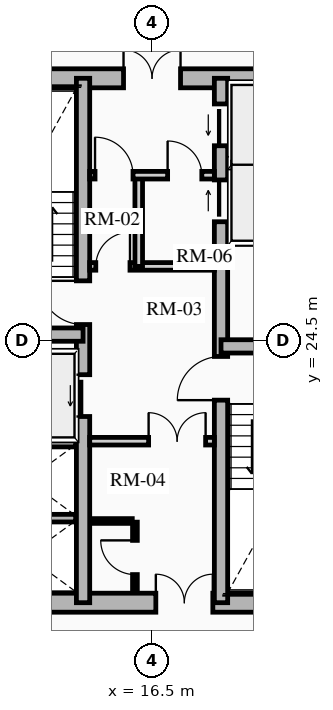
"""IFC4 building model, lengths in metres.
Left out: names, types, materials, properties, quantities, classifications, styles, units other than length and angle.
Written with IfcOpenShell. Run it as: python <this file> out.ifc"""

import sys

from ifc_helpers import new_model, si_unit, direction, frame, frame_2d, origin, place, context, subcontext, project, spatial, rectangle, extrude, source, transform, mapped, element, fill, save


model = new_model("IFC4")
c1 = context("Model", 3, precision=1e-05, world=origin(), true_north=direction((0.0, 1.0)))
c2 = subcontext(c1, "Body", "Model", "MODEL_VIEW")
j1 = project(units=[si_unit("LENGTHUNIT", "METRE"), si_unit("PLANEANGLEUNIT", "RADIAN")], contexts=[c1])
p1 = place(None, origin())
s1 = spatial("IfcSite", under=j1, at=p1, CompositionType="ELEMENT")
p2 = place(p1, origin())
s2 = spatial("IfcBuilding", under=s1, at=p2, CompositionType="ELEMENT")
p3 = place(p2, frame((0.0, 0.0, 24.91)))
s3 = spatial("IfcBuildingStorey", under=s2, at=p3, CompositionType="ELEMENT", Elevation=24.91)
p4 = place(p3, frame((11.15, 17.6, 0.0), z_axis=(0.0, 0.0, 1.0), x_axis=(1.0, 0.0, 0.0)))
e1 = element("IfcWall", 1, at=p4, inside=s3, PredefinedType="SHEAR", context=c2, shape_type="SweptSolid", body=[
    extrude(rectangle(XDim=10.7, YDim=0.5, at=frame_2d((5.35, 0.0))), origin(), (0.0, 0.0, 1.0), 2.91),
])
m1 = source(origin(), c2, "Body", "SweptSolid", [
    extrude(rectangle(XDim=1.5, YDim=2.02, at=frame_2d((0.75, 1.01))), frame((0.0, 0.26, 0.0), z_axis=(0.0, -1.0, 0.0), x_axis=(1.0, 0.0, 0.0)), (0.0, 0.0, 1.0), 0.52),
])
p5 = place(p4, frame((5.45, 0.0, 0.0)))
e2 = element("IfcOpeningElement", 2, at=p5, cuts=e1, PredefinedType="OPENING", context=c2, shape_type="MappedRepresentation", body=[
    mapped(m1, transform((0.0, 0.0, 0.0), x_axis=(1.0, 0.0, 0.0), y_axis=(0.0, 1.0, 0.0), z_axis=(0.0, 0.0, 1.0), scale=1.0)),
])
p6 = place(p3, frame((11.15, 31.4, 0.0), z_axis=(0.0, 0.0, 1.0), x_axis=(1.0, 0.0, 0.0)))
e3 = element("IfcWall", 3, at=p6, inside=s3, PredefinedType="SHEAR", context=c2, shape_type="SweptSolid", body=[
    extrude(rectangle(XDim=10.7, YDim=0.5, at=frame_2d((5.35, 0.0))), origin(), (0.0, 0.0, 1.0), 2.91),
])
p7 = place(p6, frame((4.6, 0.0, 0.0)))
e4 = element("IfcOpeningElement", 4, at=p7, cuts=e3, PredefinedType="OPENING", context=c2, shape_type="MappedRepresentation", body=[
    mapped(m1, transform((0.0, 0.0, 0.0), x_axis=(1.0, 0.0, 0.0), y_axis=(0.0, 1.0, 0.0), z_axis=(0.0, 0.0, 1.0), scale=1.0)),
])
p8 = place(p3, frame((14.685, 17.6, 0.0), z_axis=(0.0, 0.0, 1.0), x_axis=(0.0, 1.0, 0.0)))
e5 = element("IfcWall", 5, at=p8, inside=s3, PredefinedType="SHEAR", context=c2, shape_type="SweptSolid", body=[
    extrude(rectangle(XDim=13.8, YDim=0.35, at=frame_2d((6.9, 0.0))), origin(), (0.0, 0.0, 1.0), 2.91),
])
m2 = source(origin(), c2, "Body", "SweptSolid", [
    extrude(rectangle(XDim=1.1, YDim=2.015, at=frame_2d((0.55, 1.007))), frame((0.0, 0.185, 0.0), z_axis=(0.0, -1.0, 0.0), x_axis=(1.0, 0.0, 0.0)), (0.0, 0.0, 1.0), 0.37),
])
p9 = place(p8, frame((4.9, 0.0, 0.0)))
e6 = element("IfcOpeningElement", 6, at=p9, cuts=e5, PredefinedType="OPENING", context=c2, shape_type="MappedRepresentation", body=[
    mapped(m2, transform((0.0, 0.0, 0.0), x_axis=(1.0, 0.0, 0.0), y_axis=(0.0, 1.0, 0.0), z_axis=(0.0, 0.0, 1.0), scale=1.0)),
])
m3 = source(origin(), c2, "Body", "SweptSolid", [
    extrude(rectangle(XDim=1.15, YDim=2.02, at=frame_2d((0.575, 1.01))), frame((0.0, 0.185, 0.0), z_axis=(0.0, -1.0, 0.0), x_axis=(1.0, 0.0, 0.0)), (0.0, 0.0, 1.0), 0.37),
])
p10 = place(p8, frame((7.32, 0.0, 0.0)))
e7 = element("IfcOpeningElement", 7, at=p10, cuts=e5, PredefinedType="OPENING", context=c2, shape_type="MappedRepresentation", body=[
    mapped(m3, transform((0.0, 0.0, 0.0), x_axis=(1.0, 0.0, 0.0), y_axis=(0.0, 1.0, 0.0), z_axis=(0.0, 0.0, 1.0), scale=1.0)),
])
p11 = place(p3, frame((18.315, 17.6, 0.0), z_axis=(0.0, 0.0, 1.0), x_axis=(0.0, 1.0, 0.0)))
e8 = element("IfcWall", 8, at=p11, inside=s3, PredefinedType="SHEAR", context=c2, shape_type="SweptSolid", body=[
    extrude(rectangle(XDim=13.8, YDim=0.35, at=frame_2d((6.9, 0.0))), origin(), (0.0, 0.0, 1.0), 2.91),
])
p12 = place(p11, frame((10.025, 0.0, 0.0)))
e9 = element("IfcOpeningElement", 9, at=p12, cuts=e8, PredefinedType="OPENING", context=c2, shape_type="MappedRepresentation", body=[
    mapped(m2, transform((0.0, 0.0, 0.0), x_axis=(1.0, 0.0, 0.0), y_axis=(0.0, 1.0, 0.0), z_axis=(0.0, 0.0, 1.0), scale=1.0)),
])
p13 = place(p11, frame((12.025, 0.0, 0.0)))
e10 = element("IfcOpeningElement", 10, at=p13, cuts=e8, PredefinedType="OPENING", context=c2, shape_type="MappedRepresentation", body=[
    mapped(m2, transform((0.0, 0.0, 0.0), x_axis=(1.0, 0.0, 0.0), y_axis=(0.0, 1.0, 0.0), z_axis=(0.0, 0.0, 1.0), scale=1.0)),
])
p14 = place(p11, frame((5.33, 0.0, 0.0)))
e11 = element("IfcOpeningElement", 11, at=p14, cuts=e8, PredefinedType="OPENING", context=c2, shape_type="MappedRepresentation", body=[
    mapped(m3, transform((0.0, 0.0, 0.0), x_axis=(1.0, 0.0, 0.0), y_axis=(0.0, 1.0, 0.0), z_axis=(0.0, 0.0, 1.0), scale=1.0)),
])
for number, where, z_axis, x_axis in (
    (12, (11.4, 24.655, 0.0), (0.0, 0.0, 1.0), (1.0, 0.0, 0.0)),
    (13, (18.315, 24.345, 0.0), (0.0, 0.0, 1.0), (1.0, 0.0, 0.0)),
):
    element("IfcWall", number, at=place(p3, frame(where, z_axis=z_axis, x_axis=x_axis)), inside=s3, PredefinedType="SHEAR", context=c2, shape_type="SweptSolid", body=[
        extrude(rectangle(XDim=3.285, YDim=0.35, at=frame_2d((1.643, 0.0))), origin(), (0.0, 0.0, 1.0), 2.91),
    ])
for number, where, z_axis, x_axis in (
    (14, (11.52, 21.8, 0.0), (0.0, 0.0, 1.0), (1.0, 0.0, 0.0)),
    (15, (11.52, 19.825, 0.0), (0.0, 0.0, 1.0), (1.0, 0.0, 0.0)),
    (16, (18.51, 27.13, 0.0), (0.0, 0.0, 1.0), (1.0, 0.0, 0.0)),
    (17, (18.51, 29.175, 0.0), (0.0, 0.0, 1.0), (1.0, 0.0, 0.0)),
):
    element("IfcWall", number, at=place(p3, frame(where, z_axis=z_axis, x_axis=x_axis)), inside=s3, PredefinedType="SHEAR", context=c2, shape_type="SweptSolid", body=[
        extrude(rectangle(XDim=2.97, YDim=0.2, at=frame_2d((1.485, 0.0))), origin(), (0.0, 0.0, 1.0), 2.91),
    ])
p15 = place(p3, frame((14.86, 21.85, 0.0), z_axis=(0.0, 0.0, 1.0), x_axis=(1.0, 0.0, 0.0)))
e18 = element("IfcWall", 18, at=p15, inside=s3, PredefinedType="PARTITIONING", context=c2, shape_type="SweptSolid", body=[
    extrude(rectangle(XDim=3.28, YDim=0.2, at=frame_2d((1.64, 0.0))), origin(), (0.0, 0.0, 1.0), 2.635),
])
m4 = source(origin(), c2, "Body", "SweptSolid", [
    extrude(rectangle(XDim=1.5, YDim=2.02, at=frame_2d((0.75, 1.01))), frame((0.0, 0.11, 0.0), z_axis=(0.0, -1.0, 0.0), x_axis=(1.0, 0.0, 0.0)), (0.0, 0.0, 1.0), 0.22),
])
p16 = place(p15, frame((1.55, 0.0, 0.0)))
e19 = element("IfcOpeningElement", 19, at=p16, cuts=e18, PredefinedType="OPENING", context=c2, shape_type="MappedRepresentation", body=[
    mapped(m4, transform((0.0, 0.0, 0.0), x_axis=(1.0, 0.0, 0.0), y_axis=(0.0, 1.0, 0.0), z_axis=(0.0, 0.0, 1.0), scale=1.0)),
])
p17 = place(p3, frame((14.86, 26.45, 0.0), z_axis=(0.0, 0.0, 1.0), x_axis=(1.0, 0.0, 0.0)))
e20 = element("IfcWall", 20, at=p17, inside=s3, PredefinedType="PARTITIONING", context=c2, shape_type="SweptSolid", body=[
    extrude(rectangle(XDim=3.28, YDim=0.2, at=frame_2d((1.64, 0.0))), origin(), (0.0, 0.0, 1.0), 2.635),
])
m5 = source(origin(), c2, "Body", "SweptSolid", [
    extrude(rectangle(XDim=0.9, YDim=2.005, at=frame_2d((0.45, 1.002))), frame((0.0, 0.11, 0.0), z_axis=(0.0, -1.0, 0.0), x_axis=(1.0, 0.0, 0.0)), (0.0, 0.0, 1.0), 0.22),
])
p18 = place(p17, frame((0.16, 0.0, 0.0)))
e21 = element("IfcOpeningElement", 21, at=p18, cuts=e20, PredefinedType="OPENING", context=c2, shape_type="MappedRepresentation", body=[
    mapped(m5, transform((0.0, 0.0, 0.0), x_axis=(1.0, 0.0, 0.0), y_axis=(0.0, 1.0, 0.0), z_axis=(0.0, 0.0, 1.0), scale=1.0)),
])
p19 = place(p3, frame((16.15, 26.45, 0.0), z_axis=(0.0, 0.0, 1.0), x_axis=(0.0, 1.0, 0.0)))
e22 = element("IfcWall", 22, at=p19, inside=s3, PredefinedType="PARTITIONING", context=c2, shape_type="SweptSolid", body=[
    extrude(rectangle(XDim=2.4, YDim=0.2, at=frame_2d((1.2, 0.0))), origin(), (0.0, 0.0, 1.0), 2.635),
])
p20 = place(p3, frame((14.86, 28.85, 0.0), z_axis=(0.0, 0.0, 1.0), x_axis=(1.0, 0.0, 0.0)))
e23 = element("IfcWall", 23, at=p20, inside=s3, PredefinedType="PARTITIONING", context=c2, shape_type="SweptSolid", body=[
    extrude(rectangle(XDim=3.28, YDim=0.2, at=frame_2d((1.64, 0.0))), origin(), (0.0, 0.0, 1.0), 2.635),
])
m6 = source(origin(), c2, "Body", "SweptSolid", [
    extrude(rectangle(XDim=1.0, YDim=2.015, at=frame_2d((0.5, 1.007))), frame((0.0, 0.11, 0.0), z_axis=(0.0, -1.0, 0.0), x_axis=(1.0, 0.0, 0.0)), (0.0, 0.0, 1.0), 0.22),
])
p21 = place(p20, frame((0.14, 0.0, 0.0)))
e24 = element("IfcOpeningElement", 24, at=p21, cuts=e23, PredefinedType="OPENING", context=c2, shape_type="MappedRepresentation", body=[
    mapped(m6, transform((0.0, 0.0, 0.0), x_axis=(1.0, 0.0, 0.0), y_axis=(0.0, 1.0, 0.0), z_axis=(0.0, 0.0, 1.0), scale=1.0)),
])
p22 = place(p20, frame((2.05, 0.0, 0.0)))
e25 = element("IfcOpeningElement", 25, at=p22, cuts=e23, PredefinedType="OPENING", context=c2, shape_type="MappedRepresentation", body=[
    mapped(m5, transform((0.0, 0.0, 0.0), x_axis=(1.0, 0.0, 0.0), y_axis=(0.0, 1.0, 0.0), z_axis=(0.0, 0.0, 1.0), scale=1.0)),
])
p23 = place(p3, frame((16.05, 17.92, 0.0), z_axis=(0.0, 0.0, 1.0), x_axis=(0.0, 1.0, 0.0)))
e26 = element("IfcWall", 26, at=p23, inside=s3, PredefinedType="PARTITIONING", context=c2, shape_type="SweptSolid", body=[
    extrude(rectangle(XDim=1.8, YDim=0.125, at=frame_2d((0.9, 0.0))), origin(), (0.0, 0.0, 1.0), 2.635),
])
m7 = source(origin(), c2, "Body", "SweptSolid", [
    extrude(rectangle(XDim=0.9, YDim=2.005, at=frame_2d((0.45, 1.002))), frame((0.0, 0.073, 0.0), z_axis=(0.0, -1.0, 0.0), x_axis=(1.0, 0.0, 0.0)), (0.0, 0.0, 1.0), 0.145),
])
p24 = place(p23, frame((0.42, 0.0, 0.0)))
e27 = element("IfcOpeningElement", 27, at=p24, cuts=e26, PredefinedType="OPENING", context=c2, shape_type="MappedRepresentation", body=[
    mapped(m7, transform((0.0, 0.0, 0.0), x_axis=(1.0, 0.0, 0.0), y_axis=(0.0, 1.0, 0.0), z_axis=(0.0, 0.0, 1.0), scale=1.0)),
])
p25 = place(p3, frame((14.88, 19.75, 0.0), z_axis=(0.0, 0.0, 1.0), x_axis=(1.0, 0.0, 0.0)))
e28 = element("IfcWall", 28, at=p25, inside=s3, PredefinedType="PARTITIONING", context=c2, shape_type="SweptSolid", body=[
    extrude(rectangle(XDim=1.1, YDim=0.125, at=frame_2d((0.55, 0.0))), origin(), (0.0, 0.0, 1.0), 2.635),
])
m8 = source(origin(), c2, "Body", "SweptSolid", [
    extrude(rectangle(XDim=1.1, YDim=2.015, at=frame_2d((0.55, 1.007))), frame((0.0, 0.025, 0.0), z_axis=(0.0, -1.0, 0.0), x_axis=(1.0, 0.0, 0.0)), (0.0, 0.0, 1.0), 0.05),
])
p26 = place(p9, origin())
e29 = element("IfcDoor", 29, at=p26, inside=s3, OperationType="SLIDING_TO_LEFT", PredefinedType="DOOR", context=c2, shape_type="MappedRepresentation", body=[
    mapped(m8, transform((0.0, 0.0, 0.0), x_axis=(1.0, 0.0, 0.0), y_axis=(0.0, 1.0, 0.0), z_axis=(0.0, 0.0, 1.0), scale=1.0)),
])
fill(e6, e29)
p27 = place(p12, origin())
e30 = element("IfcDoor", 30, at=p27, inside=s3, OperationType="SLIDING_TO_RIGHT", PredefinedType="DOOR", context=c2, shape_type="MappedRepresentation", body=[
    mapped(m8, transform((0.0, 0.0, 0.0), x_axis=(1.0, 0.0, 0.0), y_axis=(0.0, 1.0, 0.0), z_axis=(0.0, 0.0, 1.0), scale=1.0)),
])
fill(e9, e30)
p28 = place(p13, origin())
e31 = element("IfcDoor", 31, at=p28, inside=s3, OperationType="SLIDING_TO_LEFT", PredefinedType="DOOR", context=c2, shape_type="MappedRepresentation", body=[
    mapped(m8, transform((0.0, 0.0, 0.0), x_axis=(1.0, 0.0, 0.0), y_axis=(0.0, 1.0, 0.0), z_axis=(0.0, 0.0, 1.0), scale=1.0)),
])
fill(e10, e31)
m9 = source(origin(), c2, "Body", "SweptSolid", [
    extrude(rectangle(XDim=1.15, YDim=2.02, at=frame_2d((0.575, 1.01))), frame((0.0, 0.025, 0.0), z_axis=(0.0, -1.0, 0.0), x_axis=(1.0, 0.0, 0.0)), (0.0, 0.0, 1.0), 0.05),
])
p29 = place(p10, origin())
e32 = element("IfcDoor", 32, at=p29, inside=s3, OperationType="SINGLE_SWING_RIGHT", PredefinedType="DOOR", context=c2, shape_type="MappedRepresentation", body=[
    mapped(m9, transform((0.0, 0.0, 0.0), x_axis=(1.0, 0.0, 0.0), y_axis=(0.0, 1.0, 0.0), z_axis=(0.0, 0.0, 1.0), scale=1.0)),
])
fill(e7, e32)
p30 = place(p14, origin())
e33 = element("IfcDoor", 33, at=p30, inside=s3, OperationType="SINGLE_SWING_LEFT", PredefinedType="DOOR", context=c2, shape_type="MappedRepresentation", body=[
    mapped(m9, transform((0.0, 0.0, 0.0), x_axis=(1.0, 0.0, 0.0), y_axis=(0.0, 1.0, 0.0), z_axis=(0.0, 0.0, 1.0), scale=1.0)),
])
fill(e11, e33)
m10 = source(origin(), c2, "Body", "SweptSolid", [
    extrude(rectangle(XDim=1.5, YDim=2.02, at=frame_2d((0.75, 1.01))), frame((0.0, 0.025, 0.0), z_axis=(0.0, -1.0, 0.0), x_axis=(1.0, 0.0, 0.0)), (0.0, 0.0, 1.0), 0.05),
])
p31 = place(p7, origin())
e34 = element("IfcDoor", 34, at=p31, inside=s3, OperationType="DOUBLE_DOOR_SINGLE_SWING", PredefinedType="DOOR", context=c2, shape_type="MappedRepresentation", body=[
    mapped(m10, transform((0.0, 0.0, 0.0), x_axis=(1.0, 0.0, 0.0), y_axis=(0.0, 1.0, 0.0), z_axis=(0.0, 0.0, 1.0), scale=1.0)),
])
fill(e4, e34)
p32 = place(p5, origin())
e35 = element("IfcDoor", 35, at=p32, inside=s3, OperationType="DOUBLE_DOOR_SINGLE_SWING", PredefinedType="DOOR", context=c2, shape_type="MappedRepresentation", body=[
    mapped(m10, transform((0.0, 0.0, 0.0), x_axis=(1.0, 0.0, 0.0), y_axis=(0.0, 1.0, 0.0), z_axis=(0.0, 0.0, 1.0), scale=1.0)),
])
fill(e2, e35)
p33 = place(p16, origin())
e36 = element("IfcDoor", 36, at=p33, inside=s3, OperationType="DOUBLE_DOOR_SINGLE_SWING", PredefinedType="DOOR", context=c2, shape_type="MappedRepresentation", body=[
    mapped(m10, transform((0.0, 0.0, 0.0), x_axis=(1.0, 0.0, 0.0), y_axis=(0.0, 1.0, 0.0), z_axis=(0.0, 0.0, 1.0), scale=1.0)),
])
fill(e19, e36)
m11 = source(origin(), c2, "Body", "SweptSolid", [
    extrude(rectangle(XDim=0.9, YDim=2.005, at=frame_2d((0.45, 1.002))), frame((0.0, 0.025, 0.0), z_axis=(0.0, -1.0, 0.0), x_axis=(1.0, 0.0, 0.0)), (0.0, 0.0, 1.0), 0.05),
])
p34 = place(p18, origin())
e37 = element("IfcDoor", 37, at=p34, inside=s3, OperationType="SINGLE_SWING_RIGHT", PredefinedType="DOOR", context=c2, shape_type="MappedRepresentation", body=[
    mapped(m11, transform((0.0, 0.0, 0.0), x_axis=(1.0, 0.0, 0.0), y_axis=(0.0, 1.0, 0.0), z_axis=(0.0, 0.0, 1.0), scale=1.0)),
])
fill(e21, e37)
m12 = source(origin(), c2, "Body", "SweptSolid", [
    extrude(rectangle(XDim=1.0, YDim=2.015, at=frame_2d((0.5, 1.007))), frame((0.0, 0.025, 0.0), z_axis=(0.0, -1.0, 0.0), x_axis=(1.0, 0.0, 0.0)), (0.0, 0.0, 1.0), 0.05),
])
p35 = place(p21, origin())
e38 = element("IfcDoor", 38, at=p35, inside=s3, OperationType="SINGLE_SWING_LEFT", PredefinedType="DOOR", context=c2, shape_type="MappedRepresentation", body=[
    mapped(m12, transform((0.0, 0.0, 0.0), x_axis=(1.0, 0.0, 0.0), y_axis=(0.0, 1.0, 0.0), z_axis=(0.0, 0.0, 1.0), scale=1.0)),
])
fill(e24, e38)
p36 = place(p24, origin())
e39 = element("IfcDoor", 39, at=p36, inside=s3, OperationType="SINGLE_SWING_RIGHT", PredefinedType="DOOR", context=c2, shape_type="MappedRepresentation", body=[
    mapped(m11, transform((0.0, 0.0, 0.0), x_axis=(1.0, 0.0, 0.0), y_axis=(0.0, 1.0, 0.0), z_axis=(0.0, 0.0, 1.0), scale=1.0)),
])
fill(e27, e39)
p37 = place(p22, origin())
e40 = element("IfcDoor", 40, at=p37, inside=s3, OperationType="SINGLE_SWING_LEFT", PredefinedType="DOOR", context=c2, shape_type="MappedRepresentation", body=[
    mapped(m11, transform((0.0, 0.0, 0.0), x_axis=(1.0, 0.0, 0.0), y_axis=(0.0, 1.0, 0.0), z_axis=(0.0, 0.0, 1.0), scale=1.0)),
])
fill(e25, e40)
save(model, sys.argv[1])
